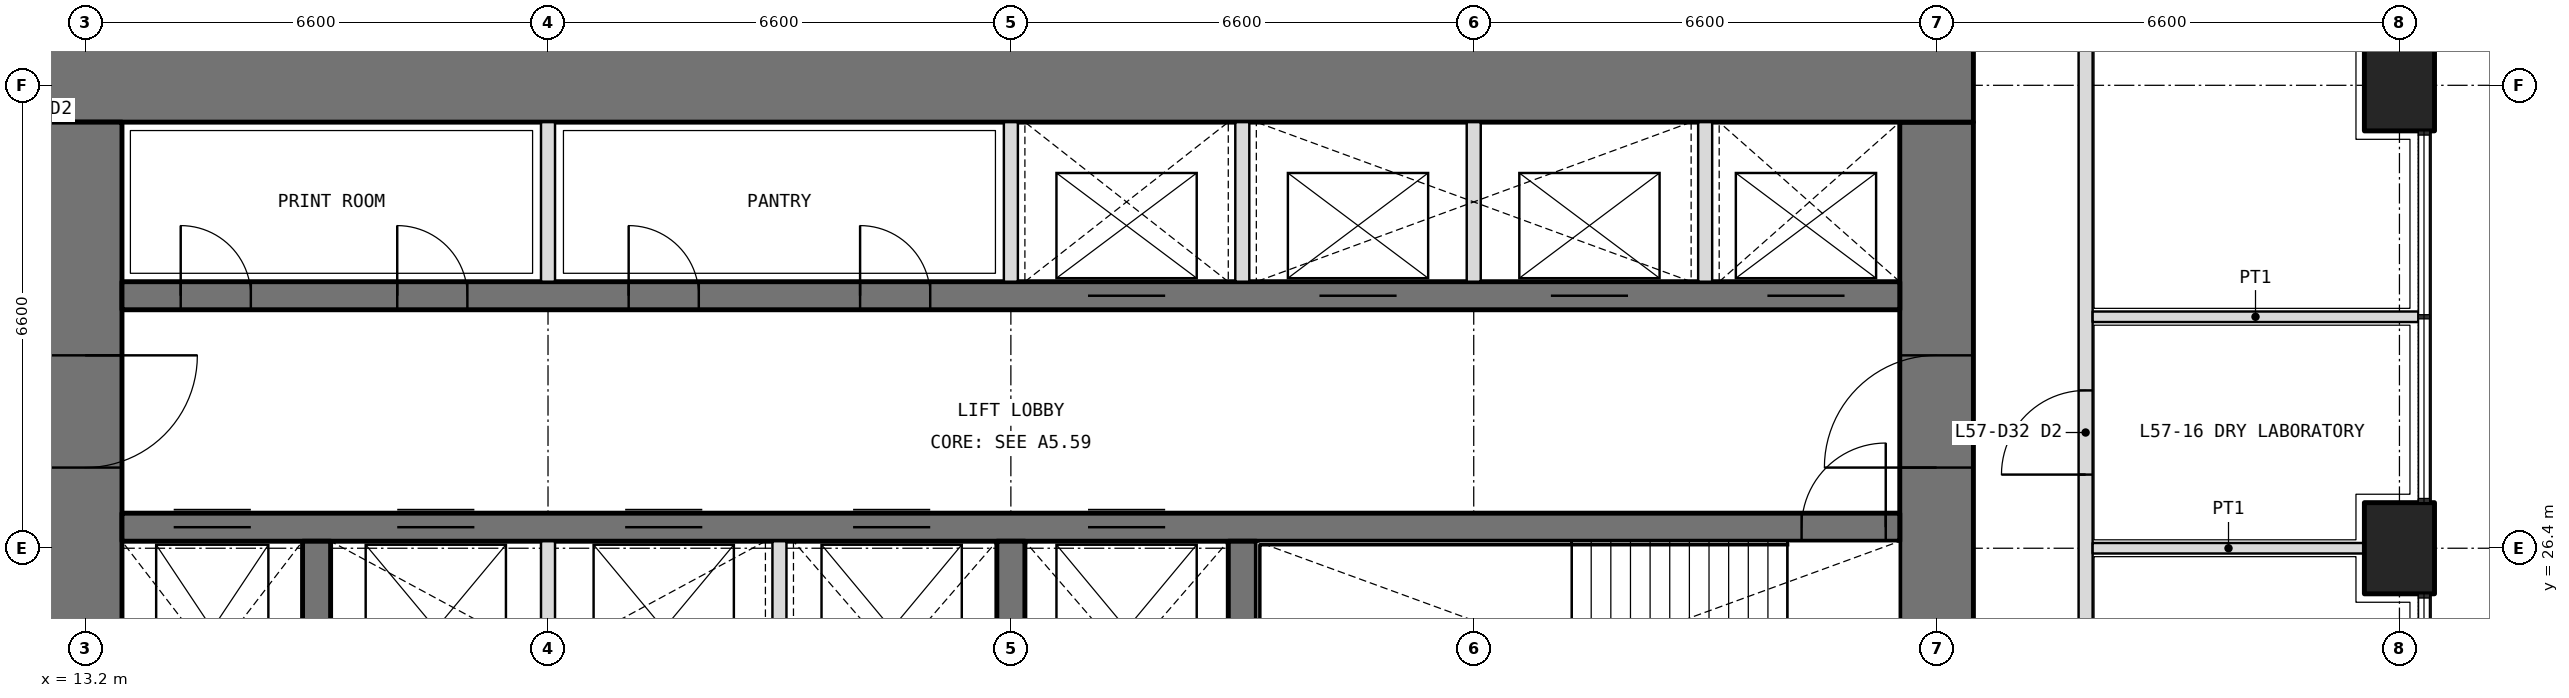
"""IFC4 building model, lengths in metres.
Left out: names, types, materials, properties, quantities, classifications, styles, units other than length and angle.
Written with IfcOpenShell. Run it as: python <this file> out.ifc"""

import sys

from ifc_helpers import new_model, si_unit, direction, frame, frame_2d, origin, origin_2d, place, context, subcontext, project, spatial, rectangle, extrude, element, fill, save


model = new_model("IFC4")
c1 = context("Model", 3, precision=1e-05, world=origin(), true_north=direction((0.0, 1.0)))
c2 = subcontext(c1, "Body", "Model", "MODEL_VIEW")
j1 = project(units=[si_unit("LENGTHUNIT", "METRE"), si_unit("PLANEANGLEUNIT", "RADIAN")], contexts=[c1])
p1 = place(None, origin())
s1 = spatial("IfcSite", under=j1, at=p1, CompositionType="ELEMENT")
p2 = place(p1, origin())
s2 = spatial("IfcBuilding", under=s1, at=p2, CompositionType="ELEMENT")
p3 = place(p2, frame((0.0, 0.0, 250.2)))
s3 = spatial("IfcBuildingStorey", under=s2, at=p3, CompositionType="ELEMENT", Elevation=250.2)
for number, where, z_axis, x_axis in (
    (1, (46.2, 26.4, 0.0), (0.0, 0.0, 1.0), (0.0, 1.0, 0.0)),
    (2, (46.2, 33.0, 0.0), (0.0, 0.0, 1.0), (0.0, 1.0, 0.0)),
):
    element("IfcColumn", number, at=place(p3, frame(where, z_axis=z_axis, x_axis=x_axis)), inside=s3, PredefinedType="COLUMN", context=c2, shape_type="SweptSolid", body=[
        extrude(rectangle(XDim=1.3, YDim=1.0, at=origin_2d()), origin(), (0.0, 0.0, 1.0), 4.2),
    ])
p4 = place(p3, frame((39.6, 13.725, 0.0), z_axis=(0.0, 0.0, 1.0), x_axis=(0.0, 1.0, 0.0)))
e3 = element("IfcWall", 3, at=p4, inside=s3, PredefinedType="SHEAR", context=c2, shape_type="SweptSolid", body=[
    extrude(rectangle(XDim=18.75, YDim=1.05, at=frame_2d((9.375, 0.0))), origin(), (0.0, 0.0, 1.0), 4.2),
])
p5 = place(p4, frame((3.025, 0.0, 0.0)))
e4 = element("IfcOpeningElement", 4, at=p5, cuts=e3, PredefinedType="OPENING", context=c2, shape_type="SweptSolid", body=[
    extrude(rectangle(XDim=1.6, YDim=2.1, at=frame_2d((0.8, 1.05))), frame((0.0, 0.535, 0.0), z_axis=(0.0, -1.0, 0.0), x_axis=(1.0, 0.0, 0.0)), (0.0, 0.0, 1.0), 1.07),
])
p6 = place(p4, frame((13.825, 0.0, 0.0)))
e5 = element("IfcOpeningElement", 5, at=p6, cuts=e3, PredefinedType="OPENING", context=c2, shape_type="SweptSolid", body=[
    extrude(rectangle(XDim=1.6, YDim=2.1, at=frame_2d((0.8, 1.05))), frame((0.0, 0.535, 0.0), z_axis=(0.0, -1.0, 0.0), x_axis=(1.0, 0.0, 0.0)), (0.0, 0.0, 1.0), 1.07),
])
p7 = place(p3, frame((40.125, 33.0, 0.0), z_axis=(0.0, 0.0, 1.0), x_axis=(-1.0, 0.0, 0.0)))
e6 = element("IfcWall", 6, at=p7, inside=s3, PredefinedType="SHEAR", context=c2, shape_type="SweptSolid", body=[
    extrude(rectangle(XDim=27.45, YDim=1.05, at=frame_2d((13.725, 0.0))), origin(), (0.0, 0.0, 1.0), 4.2),
])
p8 = place(p3, frame((13.2, 32.475, 0.0), z_axis=(0.0, 0.0, 1.0), x_axis=(0.0, -1.0, 0.0)))
e7 = element("IfcWall", 7, at=p8, inside=s3, PredefinedType="SHEAR", context=c2, shape_type="SweptSolid", body=[
    extrude(rectangle(XDim=18.75, YDim=1.05, at=frame_2d((9.375, 0.0))), origin(), (0.0, 0.0, 1.0), 4.2),
])
p9 = place(p8, frame((14.125, 0.0, 0.0)))
e8 = element("IfcOpeningElement", 8, at=p9, cuts=e7, PredefinedType="OPENING", context=c2, shape_type="SweptSolid", body=[
    extrude(rectangle(XDim=1.6, YDim=2.1, at=frame_2d((0.8, 1.05))), frame((0.0, 0.535, 0.0), z_axis=(0.0, -1.0, 0.0), x_axis=(1.0, 0.0, 0.0)), (0.0, 0.0, 1.0), 1.07),
])
p10 = place(p8, frame((3.325, 0.0, 0.0)))
e9 = element("IfcOpeningElement", 9, at=p10, cuts=e7, PredefinedType="OPENING", context=c2, shape_type="SweptSolid", body=[
    extrude(rectangle(XDim=1.6, YDim=2.1, at=frame_2d((0.8, 1.05))), frame((0.0, 0.535, 0.0), z_axis=(0.0, -1.0, 0.0), x_axis=(1.0, 0.0, 0.0)), (0.0, 0.0, 1.0), 1.07),
])
p11 = place(p3, frame((13.725, 26.7, 0.0), z_axis=(0.0, 0.0, 1.0), x_axis=(1.0, 0.0, 0.0)))
e10 = element("IfcWall", 10, at=p11, inside=s3, PredefinedType="SHEAR", context=c2, shape_type="SweptSolid", body=[
    extrude(rectangle(XDim=25.35, YDim=0.4, at=frame_2d((12.675, 0.0))), origin(), (0.0, 0.0, 1.0), 4.2),
])
p12 = place(p11, frame((23.95, 0.0, 0.0)))
e11 = element("IfcOpeningElement", 11, at=p12, cuts=e10, PredefinedType="OPENING", context=c2, shape_type="SweptSolid", body=[
    extrude(rectangle(XDim=1.2, YDim=2.1, at=frame_2d((0.6, 1.05))), frame((0.0, 0.21, 0.0), z_axis=(0.0, -1.0, 0.0), x_axis=(1.0, 0.0, 0.0)), (0.0, 0.0, 1.0), 0.42),
])
p13 = place(p11, frame((0.738, 0.0, 0.0)))
e12 = element("IfcOpeningElement", 12, at=p13, cuts=e10, PredefinedType="OPENING", context=c2, shape_type="SweptSolid", body=[
    extrude(rectangle(XDim=1.1, YDim=2.1, at=frame_2d((0.55, 1.05))), frame((0.0, 0.21, 0.0), z_axis=(0.0, -1.0, 0.0), x_axis=(1.0, 0.0, 0.0)), (0.0, 0.0, 1.0), 0.42),
])
p14 = place(p11, frame((3.925, 0.0, 0.0)))
e13 = element("IfcOpeningElement", 13, at=p14, cuts=e10, PredefinedType="OPENING", context=c2, shape_type="SweptSolid", body=[
    extrude(rectangle(XDim=1.1, YDim=2.1, at=frame_2d((0.55, 1.05))), frame((0.0, 0.21, 0.0), z_axis=(0.0, -1.0, 0.0), x_axis=(1.0, 0.0, 0.0)), (0.0, 0.0, 1.0), 0.42),
])
p15 = place(p11, frame((7.175, 0.0, 0.0)))
e14 = element("IfcOpeningElement", 14, at=p15, cuts=e10, PredefinedType="OPENING", context=c2, shape_type="SweptSolid", body=[
    extrude(rectangle(XDim=1.1, YDim=2.1, at=frame_2d((0.55, 1.05))), frame((0.0, 0.21, 0.0), z_axis=(0.0, -1.0, 0.0), x_axis=(1.0, 0.0, 0.0)), (0.0, 0.0, 1.0), 0.42),
])
p16 = place(p11, frame((10.425, 0.0, 0.0)))
e15 = element("IfcOpeningElement", 15, at=p16, cuts=e10, PredefinedType="OPENING", context=c2, shape_type="SweptSolid", body=[
    extrude(rectangle(XDim=1.1, YDim=2.1, at=frame_2d((0.55, 1.05))), frame((0.0, 0.21, 0.0), z_axis=(0.0, -1.0, 0.0), x_axis=(1.0, 0.0, 0.0)), (0.0, 0.0, 1.0), 0.42),
])
p17 = place(p11, frame((13.775, 0.0, 0.0)))
e16 = element("IfcOpeningElement", 16, at=p17, cuts=e10, PredefinedType="OPENING", context=c2, shape_type="SweptSolid", body=[
    extrude(rectangle(XDim=1.1, YDim=2.1, at=frame_2d((0.55, 1.05))), frame((0.0, 0.21, 0.0), z_axis=(0.0, -1.0, 0.0), x_axis=(1.0, 0.0, 0.0)), (0.0, 0.0, 1.0), 0.42),
])
p18 = place(p3, frame((13.725, 30.0, 0.0), z_axis=(0.0, 0.0, 1.0), x_axis=(1.0, 0.0, 0.0)))
e17 = element("IfcWall", 17, at=p18, inside=s3, PredefinedType="SHEAR", context=c2, shape_type="SweptSolid", body=[
    extrude(rectangle(XDim=25.35, YDim=0.4, at=frame_2d((12.675, 0.0))), origin(), (0.0, 0.0, 1.0), 4.2),
])
p19 = place(p18, frame((0.837, 0.0, 0.0)))
e18 = element("IfcOpeningElement", 18, at=p19, cuts=e17, PredefinedType="OPENING", context=c2, shape_type="SweptSolid", body=[
    extrude(rectangle(XDim=1.0, YDim=2.1, at=frame_2d((0.5, 1.05))), frame((0.0, 0.21, 0.0), z_axis=(0.0, -1.0, 0.0), x_axis=(1.0, 0.0, 0.0)), (0.0, 0.0, 1.0), 0.42),
])
p20 = place(p18, frame((3.925, 0.0, 0.0)))
e19 = element("IfcOpeningElement", 19, at=p20, cuts=e17, PredefinedType="OPENING", context=c2, shape_type="SweptSolid", body=[
    extrude(rectangle(XDim=1.0, YDim=2.1, at=frame_2d((0.5, 1.05))), frame((0.0, 0.21, 0.0), z_axis=(0.0, -1.0, 0.0), x_axis=(1.0, 0.0, 0.0)), (0.0, 0.0, 1.0), 0.42),
])
p21 = place(p18, frame((7.225, 0.0, 0.0)))
e20 = element("IfcOpeningElement", 20, at=p21, cuts=e17, PredefinedType="OPENING", context=c2, shape_type="SweptSolid", body=[
    extrude(rectangle(XDim=1.0, YDim=2.1, at=frame_2d((0.5, 1.05))), frame((0.0, 0.21, 0.0), z_axis=(0.0, -1.0, 0.0), x_axis=(1.0, 0.0, 0.0)), (0.0, 0.0, 1.0), 0.42),
])
p22 = place(p18, frame((10.525, 0.0, 0.0)))
e21 = element("IfcOpeningElement", 21, at=p22, cuts=e17, PredefinedType="OPENING", context=c2, shape_type="SweptSolid", body=[
    extrude(rectangle(XDim=1.0, YDim=2.1, at=frame_2d((0.5, 1.05))), frame((0.0, 0.21, 0.0), z_axis=(0.0, -1.0, 0.0), x_axis=(1.0, 0.0, 0.0)), (0.0, 0.0, 1.0), 0.42),
])
p23 = place(p18, frame((13.775, 0.0, 0.0)))
e22 = element("IfcOpeningElement", 22, at=p23, cuts=e17, PredefinedType="OPENING", context=c2, shape_type="SweptSolid", body=[
    extrude(rectangle(XDim=1.1, YDim=2.1, at=frame_2d((0.55, 1.05))), frame((0.0, 0.21, 0.0), z_axis=(0.0, -1.0, 0.0), x_axis=(1.0, 0.0, 0.0)), (0.0, 0.0, 1.0), 0.42),
])
p24 = place(p18, frame((17.075, 0.0, 0.0)))
e23 = element("IfcOpeningElement", 23, at=p24, cuts=e17, PredefinedType="OPENING", context=c2, shape_type="SweptSolid", body=[
    extrude(rectangle(XDim=1.1, YDim=2.1, at=frame_2d((0.55, 1.05))), frame((0.0, 0.21, 0.0), z_axis=(0.0, -1.0, 0.0), x_axis=(1.0, 0.0, 0.0)), (0.0, 0.0, 1.0), 0.42),
])
p25 = place(p18, frame((20.375, 0.0, 0.0)))
e24 = element("IfcOpeningElement", 24, at=p25, cuts=e17, PredefinedType="OPENING", context=c2, shape_type="SweptSolid", body=[
    extrude(rectangle(XDim=1.1, YDim=2.1, at=frame_2d((0.55, 1.05))), frame((0.0, 0.21, 0.0), z_axis=(0.0, -1.0, 0.0), x_axis=(1.0, 0.0, 0.0)), (0.0, 0.0, 1.0), 0.42),
])
p26 = place(p18, frame((23.462, 0.0, 0.0)))
e25 = element("IfcOpeningElement", 25, at=p26, cuts=e17, PredefinedType="OPENING", context=c2, shape_type="SweptSolid", body=[
    extrude(rectangle(XDim=1.1, YDim=2.1, at=frame_2d((0.55, 1.05))), frame((0.0, 0.21, 0.0), z_axis=(0.0, -1.0, 0.0), x_axis=(1.0, 0.0, 0.0)), (0.0, 0.0, 1.0), 0.42),
])
for number, where, z_axis, x_axis in (
    (26, (16.5, 23.15, 0.0), (0.0, 0.0, 1.0), (0.0, 1.0, 0.0)),
    (27, (26.4, 23.15, 0.0), (0.0, 0.0, 1.0), (0.0, 1.0, 0.0)),
    (28, (29.7, 23.15, 0.0), (0.0, 0.0, 1.0), (0.0, 1.0, 0.0)),
):
    element("IfcWall", number, at=place(p3, frame(where, z_axis=z_axis, x_axis=x_axis)), inside=s3, PredefinedType="SHEAR", context=c2, shape_type="SweptSolid", body=[
        extrude(rectangle(XDim=3.35, YDim=0.4, at=frame_2d((1.675, 0.0))), origin(), (0.0, 0.0, 1.0), 4.2),
    ])
for number, where, z_axis, x_axis in (
    (29, (19.8, 30.2, 0.0), (0.0, 0.0, 1.0), (0.0, 1.0, 0.0)),
    (30, (26.4, 30.2, 0.0), (0.0, 0.0, 1.0), (0.0, 1.0, 0.0)),
    (31, (29.7, 30.2, 0.0), (0.0, 0.0, 1.0), (0.0, 1.0, 0.0)),
    (32, (33.0, 30.2, 0.0), (0.0, 0.0, 1.0), (0.0, 1.0, 0.0)),
    (33, (36.3, 30.2, 0.0), (0.0, 0.0, 1.0), (0.0, 1.0, 0.0)),
):
    element("IfcWall", number, at=place(p3, frame(where, z_axis=z_axis, x_axis=x_axis)), inside=s3, PredefinedType="PARTITIONING", context=c2, shape_type="SweptSolid", body=[
        extrude(rectangle(XDim=2.275, YDim=0.2, at=frame_2d((1.138, 0.0))), origin(), (0.0, 0.0, 1.0), 4.2),
    ])
for number, where, z_axis, x_axis in (
    (34, (19.8, 23.15, 0.0), (0.0, 0.0, 1.0), (0.0, 1.0, 0.0)),
    (35, (23.1, 23.15, 0.0), (0.0, 0.0, 1.0), (0.0, 1.0, 0.0)),
):
    element("IfcWall", number, at=place(p3, frame(where, z_axis=z_axis, x_axis=x_axis)), inside=s3, PredefinedType="PARTITIONING", context=c2, shape_type="SweptSolid", body=[
        extrude(rectangle(XDim=3.35, YDim=0.2, at=frame_2d((1.675, 0.0))), origin(), (0.0, 0.0, 1.0), 4.2),
    ])
p27 = place(p3, frame((41.725, 7.4, 0.0), z_axis=(0.0, 0.0, 1.0), x_axis=(0.0, 1.0, 0.0)))
e36 = element("IfcWall", 36, at=p27, inside=s3, PredefinedType="PARTITIONING", context=c2, shape_type="SweptSolid", body=[
    extrude(rectangle(XDim=31.4, YDim=0.2, at=frame_2d((15.7, 0.0))), origin(), (0.0, 0.0, 1.0), 3.0),
])
p28 = place(p27, frame((4.0, 0.0, 0.0)))
e37 = element("IfcOpeningElement", 37, at=p28, cuts=e36, PredefinedType="OPENING", context=c2, shape_type="SweptSolid", body=[
    extrude(rectangle(XDim=1.0, YDim=2.1, at=frame_2d((0.5, 1.05))), frame((0.0, 0.11, 0.0), z_axis=(0.0, -1.0, 0.0), x_axis=(1.0, 0.0, 0.0)), (0.0, 0.0, 1.0), 0.22),
])
p29 = place(p27, frame((10.25, 0.0, 0.0)))
e38 = element("IfcOpeningElement", 38, at=p29, cuts=e36, PredefinedType="OPENING", context=c2, shape_type="SweptSolid", body=[
    extrude(rectangle(XDim=1.0, YDim=2.1, at=frame_2d((0.5, 1.05))), frame((0.0, 0.11, 0.0), z_axis=(0.0, -1.0, 0.0), x_axis=(1.0, 0.0, 0.0)), (0.0, 0.0, 1.0), 0.22),
])
p30 = place(p27, frame((13.4, 0.0, 0.0)))
e39 = element("IfcOpeningElement", 39, at=p30, cuts=e36, PredefinedType="OPENING", context=c2, shape_type="SweptSolid", body=[
    extrude(rectangle(XDim=1.0, YDim=2.1, at=frame_2d((0.5, 1.05))), frame((0.0, 0.11, 0.0), z_axis=(0.0, -1.0, 0.0), x_axis=(1.0, 0.0, 0.0)), (0.0, 0.0, 1.0), 0.22),
])
p31 = place(p27, frame((16.75, 0.0, 0.0)))
e40 = element("IfcOpeningElement", 40, at=p31, cuts=e36, PredefinedType="OPENING", context=c2, shape_type="SweptSolid", body=[
    extrude(rectangle(XDim=0.9, YDim=2.1, at=frame_2d((0.45, 1.05))), frame((0.0, 0.11, 0.0), z_axis=(0.0, -1.0, 0.0), x_axis=(1.0, 0.0, 0.0)), (0.0, 0.0, 1.0), 0.22),
])
p32 = place(p27, frame((20.05, 0.0, 0.0)))
e41 = element("IfcOpeningElement", 41, at=p32, cuts=e36, PredefinedType="OPENING", context=c2, shape_type="SweptSolid", body=[
    extrude(rectangle(XDim=1.2, YDim=2.1, at=frame_2d((0.6, 1.05))), frame((0.0, 0.11, 0.0), z_axis=(0.0, -1.0, 0.0), x_axis=(1.0, 0.0, 0.0)), (0.0, 0.0, 1.0), 0.22),
])
p33 = place(p27, frame((26.3, 0.0, 0.0)))
e42 = element("IfcOpeningElement", 42, at=p33, cuts=e36, PredefinedType="OPENING", context=c2, shape_type="SweptSolid", body=[
    extrude(rectangle(XDim=1.2, YDim=2.1, at=frame_2d((0.6, 1.05))), frame((0.0, 0.11, 0.0), z_axis=(0.0, -1.0, 0.0), x_axis=(1.0, 0.0, 0.0)), (0.0, 0.0, 1.0), 0.22),
])
p34 = place(p3, frame((45.7, 26.4, 0.0), z_axis=(0.0, 0.0, 1.0), x_axis=(-1.0, 0.0, 0.0)))
e43 = element("IfcWall", 43, at=p34, inside=s3, PredefinedType="PARTITIONING", context=c2, shape_type="SweptSolid", body=[
    extrude(rectangle(XDim=3.875, YDim=0.15, at=frame_2d((1.938, 0.0))), origin(), (0.0, 0.0, 1.0), 3.0),
])
p35 = place(p3, frame((46.47, 29.7, 0.0), z_axis=(0.0, 0.0, 1.0), x_axis=(-1.0, 0.0, 0.0)))
e44 = element("IfcWall", 44, at=p35, inside=s3, PredefinedType="PARTITIONING", context=c2, shape_type="SweptSolid", body=[
    extrude(rectangle(XDim=4.645, YDim=0.15, at=frame_2d((2.323, 0.0))), origin(), (0.0, 0.0, 1.0), 2.7),
])
p36 = place(p32, origin())
e45 = element("IfcDoor", 45, at=p36, inside=s3, OperationType="DOUBLE_DOOR_SINGLE_SWING", PredefinedType="DOOR", context=c2, shape_type="SweptSolid", body=[
    extrude(rectangle(XDim=1.2, YDim=2.1, at=frame_2d((0.6, 1.05))), frame((0.0, 0.025, 0.0), z_axis=(0.0, -1.0, 0.0), x_axis=(1.0, 0.0, 0.0)), (0.0, 0.0, 1.0), 0.05),
])
fill(e41, e45)
p37 = place(p19, origin())
e46 = element("IfcDoor", 46, at=p37, inside=s3, OperationType="SINGLE_SWING_LEFT", PredefinedType="DOOR", context=c2, shape_type="SweptSolid", body=[
    extrude(rectangle(XDim=1.0, YDim=2.1, at=frame_2d((0.5, 1.05))), frame((0.0, 0.025, 0.0), z_axis=(0.0, -1.0, 0.0), x_axis=(1.0, 0.0, 0.0)), (0.0, 0.0, 1.0), 0.05),
])
fill(e18, e46)
p38 = place(p20, origin())
e47 = element("IfcDoor", 47, at=p38, inside=s3, OperationType="SINGLE_SWING_LEFT", PredefinedType="DOOR", context=c2, shape_type="SweptSolid", body=[
    extrude(rectangle(XDim=1.0, YDim=2.1, at=frame_2d((0.5, 1.05))), frame((0.0, 0.025, 0.0), z_axis=(0.0, -1.0, 0.0), x_axis=(1.0, 0.0, 0.0)), (0.0, 0.0, 1.0), 0.05),
])
fill(e19, e47)
p39 = place(p21, origin())
e48 = element("IfcDoor", 48, at=p39, inside=s3, OperationType="SINGLE_SWING_LEFT", PredefinedType="DOOR", context=c2, shape_type="SweptSolid", body=[
    extrude(rectangle(XDim=1.0, YDim=2.1, at=frame_2d((0.5, 1.05))), frame((0.0, 0.025, 0.0), z_axis=(0.0, -1.0, 0.0), x_axis=(1.0, 0.0, 0.0)), (0.0, 0.0, 1.0), 0.05),
])
fill(e20, e48)
p40 = place(p22, origin())
e49 = element("IfcDoor", 49, at=p40, inside=s3, OperationType="SINGLE_SWING_LEFT", PredefinedType="DOOR", context=c2, shape_type="SweptSolid", body=[
    extrude(rectangle(XDim=1.0, YDim=2.1, at=frame_2d((0.5, 1.05))), frame((0.0, 0.025, 0.0), z_axis=(0.0, -1.0, 0.0), x_axis=(1.0, 0.0, 0.0)), (0.0, 0.0, 1.0), 0.05),
])
fill(e21, e49)
p41 = place(p12, origin())
e50 = element("IfcDoor", 50, at=p41, inside=s3, OperationType="SINGLE_SWING_RIGHT", PredefinedType="DOOR", context=c2, shape_type="SweptSolid", body=[
    extrude(rectangle(XDim=1.2, YDim=2.1, at=frame_2d((0.6, 1.05))), frame((0.0, 0.025, 0.0), z_axis=(0.0, -1.0, 0.0), x_axis=(1.0, 0.0, 0.0)), (0.0, 0.0, 1.0), 0.05),
])
fill(e11, e50)
p42 = place(p10, origin())
e51 = element("IfcDoor", 51, at=p42, inside=s3, OperationType="DOUBLE_DOOR_DOUBLE_SWING", PredefinedType="DOOR", context=c2, shape_type="SweptSolid", body=[
    extrude(rectangle(XDim=1.6, YDim=2.1, at=frame_2d((0.8, 1.05))), frame((0.0, 0.025, 0.0), z_axis=(0.0, -1.0, 0.0), x_axis=(1.0, 0.0, 0.0)), (0.0, 0.0, 1.0), 0.05),
])
fill(e9, e51)
p43 = place(p6, origin())
e52 = element("IfcDoor", 52, at=p43, inside=s3, OperationType="DOUBLE_DOOR_DOUBLE_SWING", PredefinedType="DOOR", context=c2, shape_type="SweptSolid", body=[
    extrude(rectangle(XDim=1.6, YDim=2.1, at=frame_2d((0.8, 1.05))), frame((0.0, 0.025, 0.0), z_axis=(0.0, -1.0, 0.0), x_axis=(1.0, 0.0, 0.0)), (0.0, 0.0, 1.0), 0.05),
])
fill(e5, e52)
p44 = place(p23, origin())
e53 = element("IfcDoor", 53, at=p44, inside=s3, OperationType="DOUBLE_DOOR_SLIDING", PredefinedType="DOOR", context=c2, shape_type="SweptSolid", body=[
    extrude(rectangle(XDim=1.1, YDim=2.1, at=frame_2d((0.55, 1.05))), frame((0.0, 0.025, 0.0), z_axis=(0.0, -1.0, 0.0), x_axis=(1.0, 0.0, 0.0)), (0.0, 0.0, 1.0), 0.05),
])
fill(e22, e53)
p45 = place(p24, origin())
e54 = element("IfcDoor", 54, at=p45, inside=s3, OperationType="DOUBLE_DOOR_SLIDING", PredefinedType="DOOR", context=c2, shape_type="SweptSolid", body=[
    extrude(rectangle(XDim=1.1, YDim=2.1, at=frame_2d((0.55, 1.05))), frame((0.0, 0.025, 0.0), z_axis=(0.0, -1.0, 0.0), x_axis=(1.0, 0.0, 0.0)), (0.0, 0.0, 1.0), 0.05),
])
fill(e23, e54)
p46 = place(p25, origin())
e55 = element("IfcDoor", 55, at=p46, inside=s3, OperationType="DOUBLE_DOOR_SLIDING", PredefinedType="DOOR", context=c2, shape_type="SweptSolid", body=[
    extrude(rectangle(XDim=1.1, YDim=2.1, at=frame_2d((0.55, 1.05))), frame((0.0, 0.025, 0.0), z_axis=(0.0, -1.0, 0.0), x_axis=(1.0, 0.0, 0.0)), (0.0, 0.0, 1.0), 0.05),
])
fill(e24, e55)
p47 = place(p26, origin())
e56 = element("IfcDoor", 56, at=p47, inside=s3, OperationType="DOUBLE_DOOR_SLIDING", PredefinedType="DOOR", context=c2, shape_type="SweptSolid", body=[
    extrude(rectangle(XDim=1.1, YDim=2.1, at=frame_2d((0.55, 1.05))), frame((0.0, 0.025, 0.0), z_axis=(0.0, -1.0, 0.0), x_axis=(1.0, 0.0, 0.0)), (0.0, 0.0, 1.0), 0.05),
])
fill(e25, e56)
p48 = place(p13, origin())
e57 = element("IfcDoor", 57, at=p48, inside=s3, OperationType="DOUBLE_DOOR_SLIDING", PredefinedType="DOOR", context=c2, shape_type="SweptSolid", body=[
    extrude(rectangle(XDim=1.1, YDim=2.1, at=frame_2d((0.55, 1.05))), frame((0.0, 0.025, 0.0), z_axis=(0.0, -1.0, 0.0), x_axis=(1.0, 0.0, 0.0)), (0.0, 0.0, 1.0), 0.05),
])
fill(e12, e57)
p49 = place(p14, origin())
e58 = element("IfcDoor", 58, at=p49, inside=s3, OperationType="DOUBLE_DOOR_SLIDING", PredefinedType="DOOR", context=c2, shape_type="SweptSolid", body=[
    extrude(rectangle(XDim=1.1, YDim=2.1, at=frame_2d((0.55, 1.05))), frame((0.0, 0.025, 0.0), z_axis=(0.0, -1.0, 0.0), x_axis=(1.0, 0.0, 0.0)), (0.0, 0.0, 1.0), 0.05),
])
fill(e13, e58)
p50 = place(p15, origin())
e59 = element("IfcDoor", 59, at=p50, inside=s3, OperationType="DOUBLE_DOOR_SLIDING", PredefinedType="DOOR", context=c2, shape_type="SweptSolid", body=[
    extrude(rectangle(XDim=1.1, YDim=2.1, at=frame_2d((0.55, 1.05))), frame((0.0, 0.025, 0.0), z_axis=(0.0, -1.0, 0.0), x_axis=(1.0, 0.0, 0.0)), (0.0, 0.0, 1.0), 0.05),
])
fill(e14, e59)
p51 = place(p16, origin())
e60 = element("IfcDoor", 60, at=p51, inside=s3, OperationType="DOUBLE_DOOR_SLIDING", PredefinedType="DOOR", context=c2, shape_type="SweptSolid", body=[
    extrude(rectangle(XDim=1.1, YDim=2.1, at=frame_2d((0.55, 1.05))), frame((0.0, 0.025, 0.0), z_axis=(0.0, -1.0, 0.0), x_axis=(1.0, 0.0, 0.0)), (0.0, 0.0, 1.0), 0.05),
])
fill(e15, e60)
p52 = place(p17, origin())
e61 = element("IfcDoor", 61, at=p52, inside=s3, OperationType="DOUBLE_DOOR_SLIDING", PredefinedType="DOOR", context=c2, shape_type="SweptSolid", body=[
    extrude(rectangle(XDim=1.1, YDim=2.1, at=frame_2d((0.55, 1.05))), frame((0.0, 0.025, 0.0), z_axis=(0.0, -1.0, 0.0), x_axis=(1.0, 0.0, 0.0)), (0.0, 0.0, 1.0), 0.05),
])
fill(e16, e61)
save(model, sys.argv[1])
